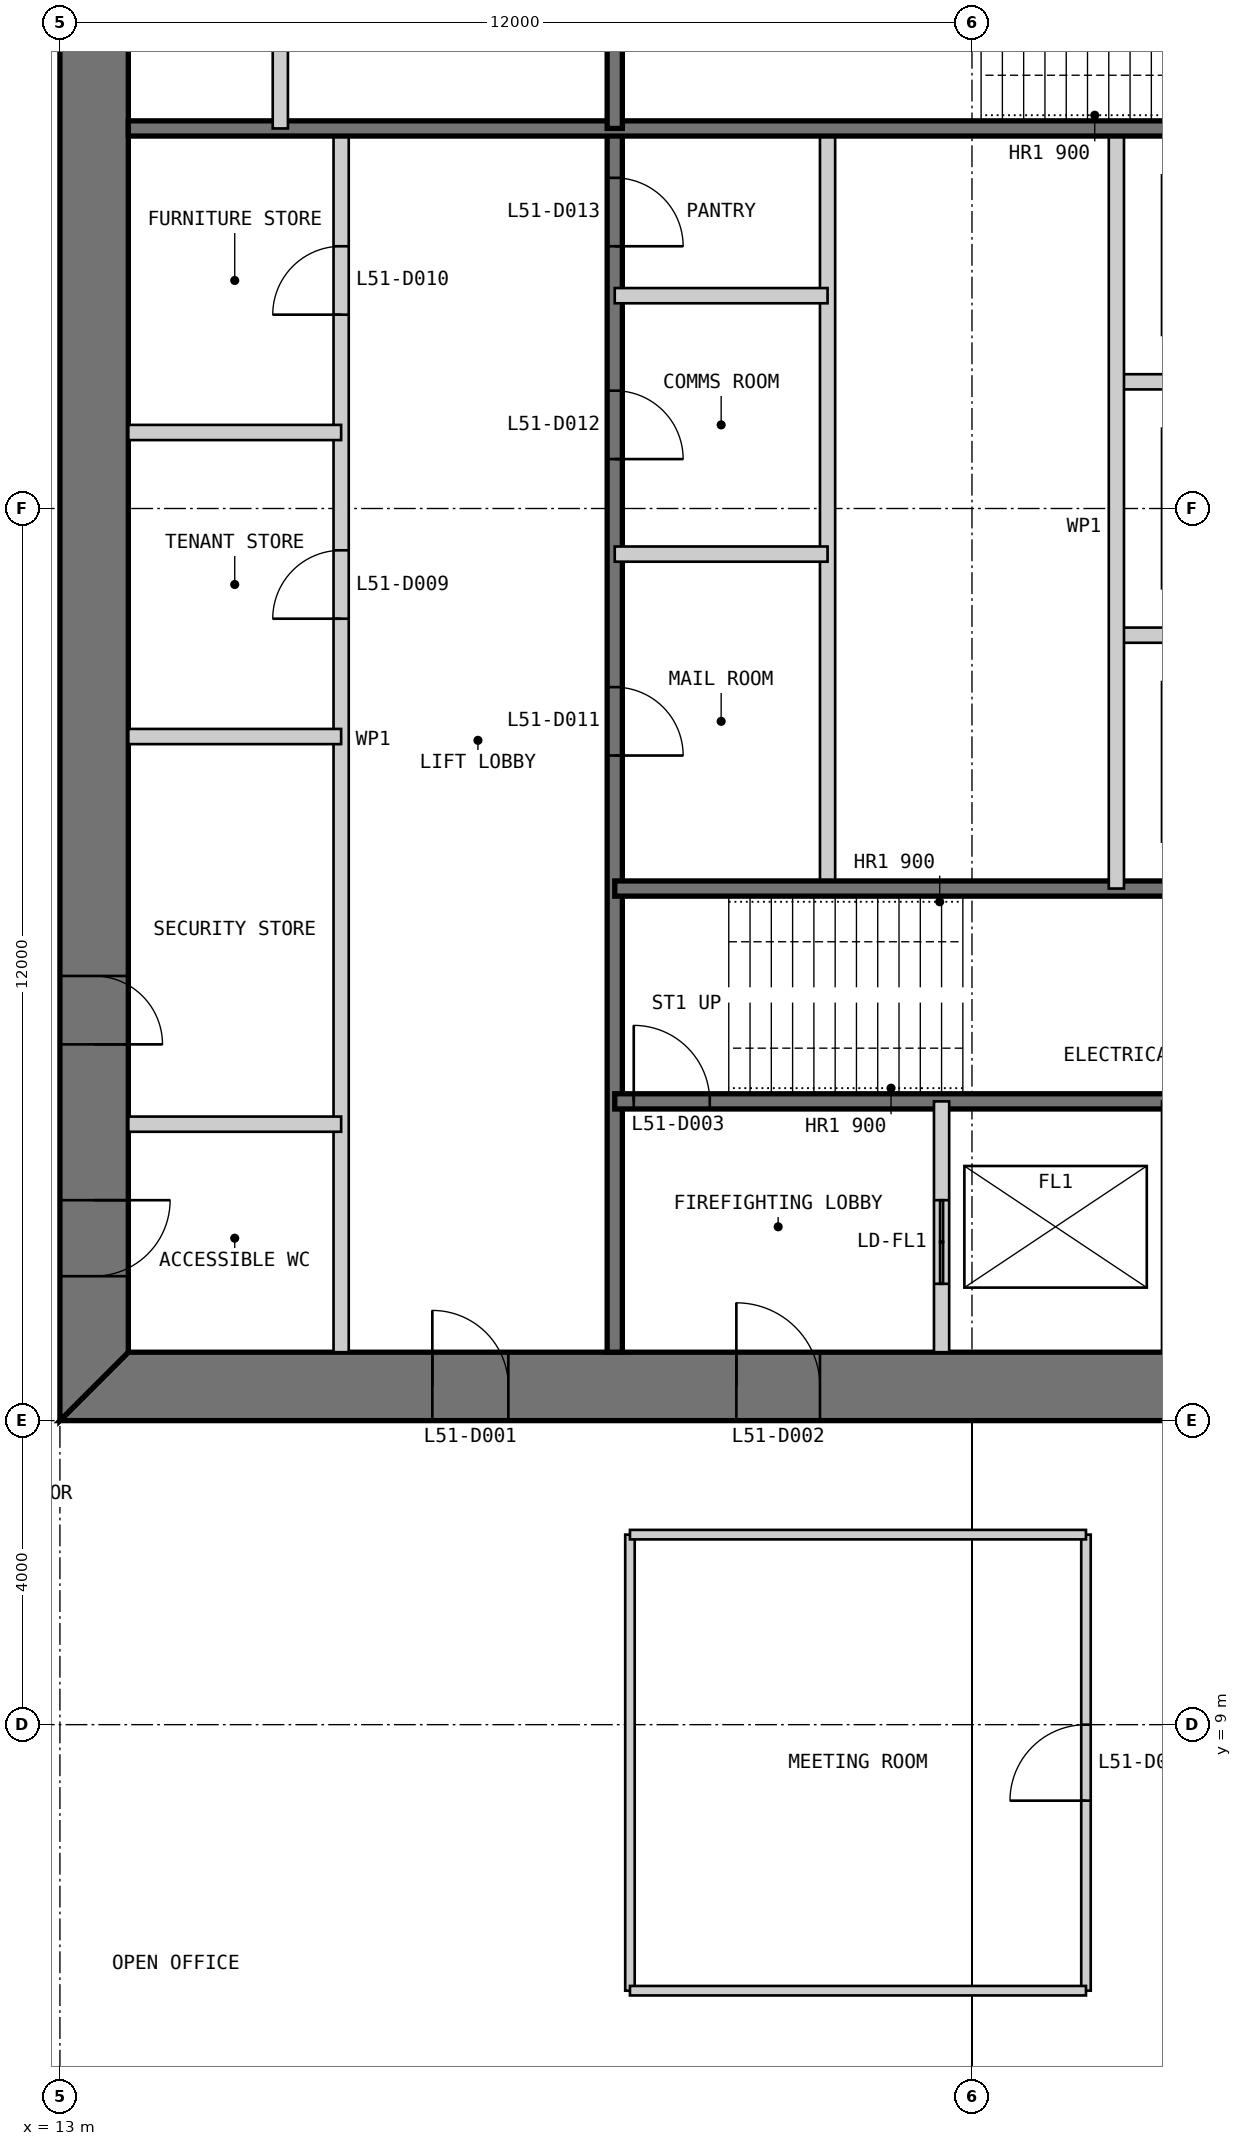
"""IFC4 building model, lengths in metres.
Left out: names, types, materials, properties, quantities, classifications, styles, units other than length and angle.
Written with IfcOpenShell. Run it as: python <this file> out.ifc"""

import sys

from ifc_helpers import new_model, si_unit, direction, frame, frame_2d, origin, place, context, subcontext, project, spatial, polyline, rectangle, outline, extrude, element, fill, save


model = new_model("IFC4")
c1 = context("Model", 3, precision=1e-05, world=origin(), true_north=direction((0.0, 1.0)))
c2 = subcontext(c1, "Body", "Model", "MODEL_VIEW")
j1 = project(units=[si_unit("LENGTHUNIT", "METRE"), si_unit("PLANEANGLEUNIT", "RADIAN")], contexts=[c1])
p1 = place(None, origin())
s1 = spatial("IfcSite", under=j1, at=p1, CompositionType="ELEMENT")
p2 = place(p1, origin())
s2 = spatial("IfcBuilding", under=s1, at=p2, CompositionType="ELEMENT")
p3 = place(p2, frame((0.0, 0.0, 217.8)))
s3 = spatial("IfcBuildingStorey", under=s2, at=p3, CompositionType="ELEMENT", Elevation=217.8)
p4 = place(p3, frame((13.0, 13.45, 0.0), z_axis=(0.0, 0.0, 1.0), x_axis=(1.0, 0.0, 0.0)))
e1 = element("IfcWall", 1, at=p4, inside=s3, PredefinedType="SHEAR", context=c2, shape_type="SweptSolid", body=[
    extrude(outline(polyline([(0.0, -0.45), (24.0, -0.45), (23.1, 0.45), (0.9, 0.45), (0.0, -0.45)])), origin(), (0.0, 0.0, 1.0), 4.0),
])
p5 = place(p4, frame((4.9, 0.0, 0.0)))
e2 = element("IfcOpeningElement", 2, at=p5, cuts=e1, PredefinedType="OPENING", context=c2, shape_type="SweptSolid", body=[
    extrude(rectangle(XDim=1.0, YDim=2.2, at=frame_2d((0.5, 1.1))), frame((0.0, 0.46, 0.0), z_axis=(0.0, -1.0, 0.0), x_axis=(1.0, 0.0, 0.0)), (0.0, 0.0, 1.0), 0.92),
])
p6 = place(p4, frame((8.9, 0.0, 0.0)))
e3 = element("IfcOpeningElement", 3, at=p6, cuts=e1, PredefinedType="OPENING", context=c2, shape_type="SweptSolid", body=[
    extrude(rectangle(XDim=1.1, YDim=2.2, at=frame_2d((0.55, 1.1))), frame((0.0, 0.46, 0.0), z_axis=(0.0, -1.0, 0.0), x_axis=(1.0, 0.0, 0.0)), (0.0, 0.0, 1.0), 0.92),
])
p7 = place(p4, frame((15.05, 0.0, 0.0)))
e4 = element("IfcOpeningElement", 4, at=p7, cuts=e1, PredefinedType="OPENING", context=c2, shape_type="SweptSolid", body=[
    extrude(rectangle(XDim=0.9, YDim=2.2, at=frame_2d((0.45, 1.1))), frame((0.0, 0.46, 0.0), z_axis=(0.0, -1.0, 0.0), x_axis=(1.0, 0.0, 0.0)), (0.0, 0.0, 1.0), 0.92),
])
p8 = place(p4, frame((17.9, 0.0, 0.0)))
e5 = element("IfcOpeningElement", 5, at=p8, cuts=e1, PredefinedType="OPENING", context=c2, shape_type="SweptSolid", body=[
    extrude(rectangle(XDim=1.0, YDim=2.2, at=frame_2d((0.5, 1.1))), frame((0.0, 0.46, 0.0), z_axis=(0.0, -1.0, 0.0), x_axis=(1.0, 0.0, 0.0)), (0.0, 0.0, 1.0), 0.92),
])
p9 = place(p4, frame((21.4, 0.0, 0.0)))
e6 = element("IfcOpeningElement", 6, at=p9, cuts=e1, PredefinedType="OPENING", context=c2, shape_type="SweptSolid", body=[
    extrude(rectangle(XDim=1.0, YDim=2.2, at=frame_2d((0.5, 1.1))), frame((0.0, 0.46, 0.0), z_axis=(0.0, -1.0, 0.0), x_axis=(1.0, 0.0, 0.0)), (0.0, 0.0, 1.0), 0.92),
])
p10 = place(p3, frame((13.45, 36.1, 0.0), z_axis=(0.0, 0.0, 1.0), x_axis=(0.0, -1.0, 0.0)))
e7 = element("IfcWall", 7, at=p10, inside=s3, PredefinedType="SHEAR", context=c2, shape_type="SweptSolid", body=[
    extrude(outline(polyline([(-0.9, -0.45), (23.1, -0.45), (22.2, 0.45), (0.0, 0.45), (-0.9, -0.45)])), origin(), (0.0, 0.0, 1.0), 4.0),
])
p11 = place(p10, frame((20.2, 0.0, 0.0)))
e8 = element("IfcOpeningElement", 8, at=p11, cuts=e7, PredefinedType="OPENING", context=c2, shape_type="SweptSolid", body=[
    extrude(rectangle(XDim=1.0, YDim=2.2, at=frame_2d((0.5, 1.1))), frame((0.0, 0.46, 0.0), z_axis=(0.0, -1.0, 0.0), x_axis=(1.0, 0.0, 0.0)), (0.0, 0.0, 1.0), 0.92),
])
p12 = place(p10, frame((17.25, 0.0, 0.0)))
e9 = element("IfcOpeningElement", 9, at=p12, cuts=e7, PredefinedType="OPENING", context=c2, shape_type="SweptSolid", body=[
    extrude(rectangle(XDim=0.9, YDim=2.2, at=frame_2d((0.45, 1.1))), frame((0.0, 0.46, 0.0), z_axis=(0.0, -1.0, 0.0), x_axis=(1.0, 0.0, 0.0)), (0.0, 0.0, 1.0), 0.92),
])
p13 = place(p3, frame((16.7, 13.9, 0.0), z_axis=(0.0, 0.0, 1.0), x_axis=(0.0, 1.0, 0.0)))
e10 = element("IfcWall", 10, at=p13, inside=s3, PredefinedType="PARTITIONING", context=c2, shape_type="SweptSolid", body=[
    extrude(rectangle(XDim=16.1, YDim=0.2, at=frame_2d((8.05, 0.0))), origin(), (0.0, 0.0, 1.0), 3.8),
])
p14 = place(p13, frame((9.65, 0.0, 0.0)))
e11 = element("IfcOpeningElement", 11, at=p14, cuts=e10, PredefinedType="OPENING", context=c2, shape_type="SweptSolid", body=[
    extrude(rectangle(XDim=0.9, YDim=2.2, at=frame_2d((0.45, 1.1))), frame((0.0, 0.11, 0.0), z_axis=(0.0, -1.0, 0.0), x_axis=(1.0, 0.0, 0.0)), (0.0, 0.0, 1.0), 0.22),
])
p15 = place(p13, frame((13.65, 0.0, 0.0)))
e12 = element("IfcOpeningElement", 12, at=p15, cuts=e10, PredefinedType="OPENING", context=c2, shape_type="SweptSolid", body=[
    extrude(rectangle(XDim=0.9, YDim=2.2, at=frame_2d((0.45, 1.1))), frame((0.0, 0.11, 0.0), z_axis=(0.0, -1.0, 0.0), x_axis=(1.0, 0.0, 0.0)), (0.0, 0.0, 1.0), 0.22),
])
p16 = place(p3, frame((20.3, 13.9, 0.0), z_axis=(0.0, 0.0, 1.0), x_axis=(0.0, 1.0, 0.0)))
e13 = element("IfcWall", 13, at=p16, inside=s3, PredefinedType="SOLIDWALL", context=c2, shape_type="SweptSolid", body=[
    extrude(rectangle(XDim=16.1, YDim=0.2, at=frame_2d((8.05, 0.0))), origin(), (0.0, 0.0, 1.0), 3.8),
])
p17 = place(p16, frame((7.85, 0.0, 0.0)))
e14 = element("IfcOpeningElement", 14, at=p17, cuts=e13, PredefinedType="OPENING", context=c2, shape_type="SweptSolid", body=[
    extrude(rectangle(XDim=0.9, YDim=2.2, at=frame_2d((0.45, 1.1))), frame((0.0, 0.11, 0.0), z_axis=(0.0, -1.0, 0.0), x_axis=(1.0, 0.0, 0.0)), (0.0, 0.0, 1.0), 0.22),
])
p18 = place(p16, frame((11.75, 0.0, 0.0)))
e15 = element("IfcOpeningElement", 15, at=p18, cuts=e13, PredefinedType="OPENING", context=c2, shape_type="SweptSolid", body=[
    extrude(rectangle(XDim=0.9, YDim=2.2, at=frame_2d((0.45, 1.1))), frame((0.0, 0.11, 0.0), z_axis=(0.0, -1.0, 0.0), x_axis=(1.0, 0.0, 0.0)), (0.0, 0.0, 1.0), 0.22),
])
p19 = place(p16, frame((14.55, 0.0, 0.0)))
e16 = element("IfcOpeningElement", 16, at=p19, cuts=e13, PredefinedType="OPENING", context=c2, shape_type="SweptSolid", body=[
    extrude(rectangle(XDim=0.9, YDim=2.2, at=frame_2d((0.45, 1.1))), frame((0.0, 0.11, 0.0), z_axis=(0.0, -1.0, 0.0), x_axis=(1.0, 0.0, 0.0)), (0.0, 0.0, 1.0), 0.22),
])
p20 = place(p3, frame((23.1, 20.0, 0.0), z_axis=(0.0, 0.0, 1.0), x_axis=(0.0, 1.0, 0.0)))
e17 = element("IfcWall", 17, at=p20, inside=s3, PredefinedType="PARTITIONING", context=c2, shape_type="SweptSolid", body=[
    extrude(rectangle(XDim=10.0, YDim=0.2, at=frame_2d((5.0, 0.0))), origin(), (0.0, 0.0, 1.0), 3.8),
])
p21 = place(p3, frame((20.3, 17.2, 0.0), z_axis=(0.0, 0.0, 1.0), x_axis=(1.0, 0.0, 0.0)))
e18 = element("IfcWall", 18, at=p21, inside=s3, PredefinedType="SOLIDWALL", context=c2, shape_type="SweptSolid", body=[
    extrude(rectangle(XDim=9.4, YDim=0.2, at=frame_2d((4.7, 0.0))), origin(), (0.0, 0.0, 1.0), 3.8),
])
p22 = place(p21, frame((0.25, 0.0, 0.0)))
e19 = element("IfcOpeningElement", 19, at=p22, cuts=e18, PredefinedType="OPENING", context=c2, shape_type="SweptSolid", body=[
    extrude(rectangle(XDim=1.0, YDim=2.2, at=frame_2d((0.5, 1.1))), frame((0.0, 0.11, 0.0), z_axis=(0.0, -1.0, 0.0), x_axis=(1.0, 0.0, 0.0)), (0.0, 0.0, 1.0), 0.22),
])
p23 = place(p3, frame((20.3, 20.0, 0.0), z_axis=(0.0, 0.0, 1.0), x_axis=(1.0, 0.0, 0.0)))
e20 = element("IfcWall", 20, at=p23, inside=s3, PredefinedType="SOLIDWALL", context=c2, shape_type="SweptSolid", body=[
    extrude(rectangle(XDim=15.8, YDim=0.2, at=frame_2d((7.9, 0.0))), origin(), (0.0, 0.0, 1.0), 3.8),
])
p24 = place(p3, frame((24.6, 13.9, 0.0), z_axis=(0.0, 0.0, 1.0), x_axis=(0.0, 1.0, 0.0)))
e21 = element("IfcWall", 21, at=p24, inside=s3, PredefinedType="PARTITIONING", context=c2, shape_type="SweptSolid", body=[
    extrude(rectangle(XDim=3.3, YDim=0.2, at=frame_2d((1.65, 0.0))), origin(), (0.0, 0.0, 1.0), 3.8),
])
p25 = place(p24, frame((0.9, 0.0, 0.0)))
e22 = element("IfcOpeningElement", 22, at=p25, cuts=e21, PredefinedType="OPENING", context=c2, shape_type="SweptSolid", body=[
    extrude(rectangle(XDim=1.1, YDim=2.2, at=frame_2d((0.55, 1.1))), frame((0.0, 0.11, 0.0), z_axis=(0.0, -1.0, 0.0), x_axis=(1.0, 0.0, 0.0)), (0.0, 0.0, 1.0), 0.22),
])
for number, where, z_axis, x_axis in (
    (23, (13.9, 16.9, 0.0), (0.0, 0.0, 1.0), (1.0, 0.0, 0.0)),
    (24, (13.9, 22.0, 0.0), (0.0, 0.0, 1.0), (1.0, 0.0, 0.0)),
    (25, (13.9, 26.0, 0.0), (0.0, 0.0, 1.0), (1.0, 0.0, 0.0)),
    (26, (20.3, 24.4, 0.0), (0.0, 0.0, 1.0), (1.0, 0.0, 0.0)),
    (27, (20.3, 27.8, 0.0), (0.0, 0.0, 1.0), (1.0, 0.0, 0.0)),
    (28, (29.7, 26.667, 0.0), (0.0, 0.0, 1.0), (-1.0, 0.0, 0.0)),
    (29, (29.7, 23.333, 0.0), (0.0, 0.0, 1.0), (-1.0, 0.0, 0.0)),
):
    element("IfcWall", number, at=place(p3, frame(where, z_axis=z_axis, x_axis=x_axis)), inside=s3, PredefinedType="PARTITIONING", context=c2, shape_type="SweptSolid", body=[
        extrude(rectangle(XDim=2.8, YDim=0.2, at=frame_2d((1.4, 0.0))), origin(), (0.0, 0.0, 1.0), 3.8),
    ])
p26 = place(p3, frame((26.9, 30.0, 0.0), z_axis=(0.0, 0.0, 1.0), x_axis=(0.0, -1.0, 0.0)))
e30 = element("IfcWall", 30, at=p26, inside=s3, PredefinedType="PARTITIONING", context=c2, shape_type="SweptSolid", body=[
    extrude(rectangle(XDim=10.0, YDim=0.2, at=frame_2d((5.0, 0.0))), origin(), (0.0, 0.0, 1.0), 3.8),
])
p27 = place(p3, frame((29.7, 30.0, 0.0), z_axis=(0.0, 0.0, 1.0), x_axis=(-1.0, 0.0, 0.0)))
e31 = element("IfcWall", 31, at=p27, inside=s3, PredefinedType="SOLIDWALL", context=c2, shape_type="SweptSolid", body=[
    extrude(rectangle(XDim=15.8, YDim=0.2, at=frame_2d((7.9, 0.0))), origin(), (0.0, 0.0, 1.0), 3.8),
])
p28 = place(p3, frame((20.3, 36.1, 0.0), z_axis=(0.0, 0.0, 1.0), x_axis=(0.0, -1.0, 0.0)))
e32 = element("IfcWall", 32, at=p28, inside=s3, PredefinedType="SOLIDWALL", context=c2, shape_type="SweptSolid", body=[
    extrude(rectangle(XDim=6.1, YDim=0.2, at=frame_2d((3.05, 0.0))), origin(), (0.0, 0.0, 1.0), 3.8),
])
p29 = place(p3, frame((15.9, 36.1, 0.0), z_axis=(0.0, 0.0, 1.0), x_axis=(0.0, -1.0, 0.0)))
e33 = element("IfcWall", 33, at=p29, inside=s3, PredefinedType="PARTITIONING", context=c2, shape_type="SweptSolid", body=[
    extrude(rectangle(XDim=6.1, YDim=0.2, at=frame_2d((3.05, 0.0))), origin(), (0.0, 0.0, 1.0), 3.8),
])
p30 = place(p3, frame((20.5, 5.5, 0.0), z_axis=(0.0, 0.0, 1.0), x_axis=(0.0, 1.0, 0.0)))
e34 = element("IfcWall", 34, at=p30, inside=s3, PredefinedType="PARTITIONING", context=c2, shape_type="SweptSolid", body=[
    extrude(rectangle(XDim=6.0, YDim=0.125, at=frame_2d((3.0, 0.0))), origin(), (0.0, 0.0, 1.0), 3.85),
])
p31 = place(p3, frame((26.5, 5.5, 0.0), z_axis=(0.0, 0.0, 1.0), x_axis=(0.0, 1.0, 0.0)))
e35 = element("IfcWall", 35, at=p31, inside=s3, PredefinedType="PARTITIONING", context=c2, shape_type="SweptSolid", body=[
    extrude(rectangle(XDim=6.0, YDim=0.125, at=frame_2d((3.0, 0.0))), origin(), (0.0, 0.0, 1.0), 3.85),
])
p32 = place(p31, frame((2.5, 0.0, 0.0)))
e36 = element("IfcOpeningElement", 36, at=p32, cuts=e35, PredefinedType="OPENING", context=c2, shape_type="SweptSolid", body=[
    extrude(rectangle(XDim=1.0, YDim=2.2, at=frame_2d((0.5, 1.1))), frame((0.0, 0.073, 0.0), z_axis=(0.0, -1.0, 0.0), x_axis=(1.0, 0.0, 0.0)), (0.0, 0.0, 1.0), 0.145),
])
for number, where, z_axis, x_axis in (
    (37, (20.5, 5.5, 0.0), (0.0, 0.0, 1.0), (1.0, 0.0, 0.0)),
    (38, (20.5, 11.5, 0.0), (0.0, 0.0, 1.0), (1.0, 0.0, 0.0)),
):
    element("IfcWall", number, at=place(p3, frame(where, z_axis=z_axis, x_axis=x_axis)), inside=s3, PredefinedType="PARTITIONING", context=c2, shape_type="SweptSolid", body=[
        extrude(rectangle(XDim=6.0, YDim=0.125, at=frame_2d((3.0, 0.0))), origin(), (0.0, 0.0, 1.0), 3.85),
    ])
p33 = place(p5, origin())
e39 = element("IfcDoor", 39, at=p33, inside=s3, OperationType="SINGLE_SWING_LEFT", PredefinedType="DOOR", context=c2, shape_type="SweptSolid", body=[
    extrude(rectangle(XDim=1.0, YDim=2.2, at=frame_2d((0.5, 1.1))), frame((0.0, 0.025, 0.0), z_axis=(0.0, -1.0, 0.0), x_axis=(1.0, 0.0, 0.0)), (0.0, 0.0, 1.0), 0.05),
    extrude(outline(polyline([(0.0, 0.0), (0.04, 0.0), (0.04, 2.16), (0.96, 2.16), (0.96, 0.0), (1.0, 0.0), (1.0, 2.2), (0.0, 2.2), (0.0, 0.0)])), frame((0.0, 0.3, 0.0), z_axis=(0.0, -1.0, 0.0), x_axis=(1.0, 0.0, 0.0)), (0.0, 0.0, 1.0), 0.6),
])
fill(e2, e39)
p34 = place(p6, origin())
e40 = element("IfcDoor", 40, at=p34, inside=s3, OperationType="SINGLE_SWING_LEFT", PredefinedType="DOOR", context=c2, shape_type="SweptSolid", body=[
    extrude(rectangle(XDim=1.1, YDim=2.2, at=frame_2d((0.55, 1.1))), frame((0.0, 0.025, 0.0), z_axis=(0.0, -1.0, 0.0), x_axis=(1.0, 0.0, 0.0)), (0.0, 0.0, 1.0), 0.05),
    extrude(outline(polyline([(0.0, 0.0), (0.04, 0.0), (0.04, 2.16), (1.06, 2.16), (1.06, 0.0), (1.1, 0.0), (1.1, 2.2), (0.0, 2.2), (0.0, 0.0)])), frame((0.0, 0.3, 0.0), z_axis=(0.0, -1.0, 0.0), x_axis=(1.0, 0.0, 0.0)), (0.0, 0.0, 1.0), 0.6),
])
fill(e3, e40)
p35 = place(p22, origin())
e41 = element("IfcDoor", 41, at=p35, inside=s3, OperationType="SINGLE_SWING_LEFT", PredefinedType="DOOR", context=c2, shape_type="SweptSolid", body=[
    extrude(rectangle(XDim=1.0, YDim=2.2, at=frame_2d((0.5, 1.1))), frame((0.0, 0.025, 0.0), z_axis=(0.0, -1.0, 0.0), x_axis=(1.0, 0.0, 0.0)), (0.0, 0.0, 1.0), 0.05),
])
fill(e19, e41)
p36 = place(p11, origin())
e42 = element("IfcDoor", 42, at=p36, inside=s3, OperationType="SINGLE_SWING_LEFT", PredefinedType="DOOR", context=c2, shape_type="SweptSolid", body=[
    extrude(rectangle(XDim=1.0, YDim=2.2, at=frame_2d((0.5, 1.1))), frame((0.0, 0.025, 0.0), z_axis=(0.0, -1.0, 0.0), x_axis=(1.0, 0.0, 0.0)), (0.0, 0.0, 1.0), 0.05),
    extrude(outline(polyline([(0.0, 0.0), (0.04, 0.0), (0.04, 2.16), (0.96, 2.16), (0.96, 0.0), (1.0, 0.0), (1.0, 2.2), (0.0, 2.2), (0.0, 0.0)])), frame((0.0, 0.3, 0.0), z_axis=(0.0, -1.0, 0.0), x_axis=(1.0, 0.0, 0.0)), (0.0, 0.0, 1.0), 0.6),
])
fill(e8, e42)
p37 = place(p12, origin())
e43 = element("IfcDoor", 43, at=p37, inside=s3, OperationType="SINGLE_SWING_RIGHT", PredefinedType="DOOR", context=c2, shape_type="SweptSolid", body=[
    extrude(rectangle(XDim=0.9, YDim=2.2, at=frame_2d((0.45, 1.1))), frame((0.0, 0.025, 0.0), z_axis=(0.0, -1.0, 0.0), x_axis=(1.0, 0.0, 0.0)), (0.0, 0.0, 1.0), 0.05),
    extrude(outline(polyline([(0.0, 0.0), (0.04, 0.0), (0.04, 2.16), (0.86, 2.16), (0.86, 0.0), (0.9, 0.0), (0.9, 2.2), (0.0, 2.2), (0.0, 0.0)])), frame((0.0, 0.3, 0.0), z_axis=(0.0, -1.0, 0.0), x_axis=(1.0, 0.0, 0.0)), (0.0, 0.0, 1.0), 0.6),
])
fill(e9, e43)
p38 = place(p14, origin())
e44 = element("IfcDoor", 44, at=p38, inside=s3, OperationType="SINGLE_SWING_LEFT", PredefinedType="DOOR", context=c2, shape_type="SweptSolid", body=[
    extrude(rectangle(XDim=0.9, YDim=2.2, at=frame_2d((0.45, 1.1))), frame((0.0, 0.025, 0.0), z_axis=(0.0, -1.0, 0.0), x_axis=(1.0, 0.0, 0.0)), (0.0, 0.0, 1.0), 0.05),
])
fill(e11, e44)
p39 = place(p15, origin())
e45 = element("IfcDoor", 45, at=p39, inside=s3, OperationType="SINGLE_SWING_LEFT", PredefinedType="DOOR", context=c2, shape_type="SweptSolid", body=[
    extrude(rectangle(XDim=0.9, YDim=2.2, at=frame_2d((0.45, 1.1))), frame((0.0, 0.025, 0.0), z_axis=(0.0, -1.0, 0.0), x_axis=(1.0, 0.0, 0.0)), (0.0, 0.0, 1.0), 0.05),
])
fill(e12, e45)
p40 = place(p17, frame((0.9, 0.0, 0.0), z_axis=(0.0, 0.0, 1.0), x_axis=(-1.0, 0.0, 0.0)))
e46 = element("IfcDoor", 46, at=p40, inside=s3, OperationType="SINGLE_SWING_RIGHT", PredefinedType="DOOR", context=c2, shape_type="SweptSolid", body=[
    extrude(rectangle(XDim=0.9, YDim=2.2, at=frame_2d((0.45, 1.1))), frame((0.0, 0.025, 0.0), z_axis=(0.0, -1.0, 0.0), x_axis=(1.0, 0.0, 0.0)), (0.0, 0.0, 1.0), 0.05),
])
fill(e14, e46)
p41 = place(p18, frame((0.9, 0.0, 0.0), z_axis=(0.0, 0.0, 1.0), x_axis=(-1.0, 0.0, 0.0)))
e47 = element("IfcDoor", 47, at=p41, inside=s3, OperationType="SINGLE_SWING_RIGHT", PredefinedType="DOOR", context=c2, shape_type="SweptSolid", body=[
    extrude(rectangle(XDim=0.9, YDim=2.2, at=frame_2d((0.45, 1.1))), frame((0.0, 0.025, 0.0), z_axis=(0.0, -1.0, 0.0), x_axis=(1.0, 0.0, 0.0)), (0.0, 0.0, 1.0), 0.05),
])
fill(e15, e47)
p42 = place(p19, frame((0.9, 0.0, 0.0), z_axis=(0.0, 0.0, 1.0), x_axis=(-1.0, 0.0, 0.0)))
e48 = element("IfcDoor", 48, at=p42, inside=s3, OperationType="SINGLE_SWING_RIGHT", PredefinedType="DOOR", context=c2, shape_type="SweptSolid", body=[
    extrude(rectangle(XDim=0.9, YDim=2.2, at=frame_2d((0.45, 1.1))), frame((0.0, 0.025, 0.0), z_axis=(0.0, -1.0, 0.0), x_axis=(1.0, 0.0, 0.0)), (0.0, 0.0, 1.0), 0.05),
])
fill(e16, e48)
p43 = place(p32, origin())
e49 = element("IfcDoor", 49, at=p43, inside=s3, OperationType="SINGLE_SWING_LEFT", PredefinedType="DOOR", context=c2, shape_type="SweptSolid", body=[
    extrude(rectangle(XDim=1.0, YDim=2.2, at=frame_2d((0.5, 1.1))), frame((0.0, 0.025, 0.0), z_axis=(0.0, -1.0, 0.0), x_axis=(1.0, 0.0, 0.0)), (0.0, 0.0, 1.0), 0.05),
])
fill(e36, e49)
p44 = place(p25, origin())
e50 = element("IfcDoor", 50, at=p44, inside=s3, OperationType="DOUBLE_DOOR_SLIDING", PredefinedType="DOOR", context=c2, shape_type="SweptSolid", body=[
    extrude(rectangle(XDim=1.1, YDim=2.2, at=frame_2d((0.55, 1.1))), frame((0.0, 0.025, 0.0), z_axis=(0.0, -1.0, 0.0), x_axis=(1.0, 0.0, 0.0)), (0.0, 0.0, 1.0), 0.05),
])
fill(e22, e50)
save(model, sys.argv[1])
